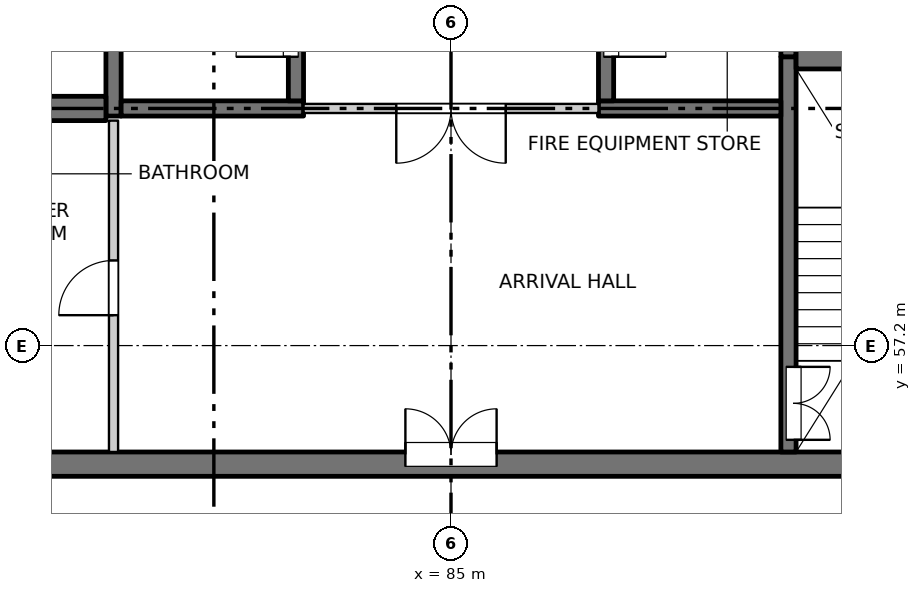
"""IFC4 building model, lengths in metres.
Left out: names, types, materials, properties, quantities, classifications, styles, units other than length and angle.
Written with IfcOpenShell. Run it as: python <this file> out.ifc"""

import sys

from ifc_helpers import new_model, si_unit, direction, frame, frame_2d, origin, place, context, subcontext, project, spatial, rectangle, extrude, element, fill, save


model = new_model("IFC4")
c1 = context("Model", 3, precision=1e-05, world=origin(), true_north=direction((0.0, 1.0)))
c2 = subcontext(c1, "Body", "Model", "MODEL_VIEW")
j1 = project(units=[si_unit("LENGTHUNIT", "METRE"), si_unit("PLANEANGLEUNIT", "RADIAN")], contexts=[c1])
p1 = place(None, origin())
s1 = spatial("IfcSite", under=j1, at=p1, CompositionType="ELEMENT")
p2 = place(p1, origin())
s2 = spatial("IfcBuilding", under=s1, at=p2, CompositionType="ELEMENT")
p3 = place(p2, frame((0.0, 0.0, 221.1)))
s3 = spatial("IfcBuildingStorey", under=s2, at=p3, CompositionType="ELEMENT", Elevation=221.1)
p4 = place(p3, frame((75.45, 55.25, -0.25), z_axis=(0.0, 0.0, 1.0), x_axis=(1.0, 0.0, 0.0)))
e1 = element("IfcWall", 1, at=p4, inside=s3, PredefinedType="SOLIDWALL", context=c2, shape_type="SweptSolid", body=[
    extrude(rectangle(XDim=19.1, YDim=0.4, at=frame_2d((9.55, 0.0))), origin(), (0.0, 0.0, 1.0), 3.4),
])
p5 = place(p4, frame((8.8, 0.0, 0.25)))
e2 = element("IfcOpeningElement", 2, at=p5, cuts=e1, PredefinedType="OPENING", context=c2, shape_type="SweptSolid", body=[
    extrude(rectangle(XDim=1.5, YDim=2.1, at=frame_2d((0.75, 1.05))), frame((0.0, 0.21, 0.0), z_axis=(0.0, -1.0, 0.0), x_axis=(1.0, 0.0, 0.0)), (0.0, 0.0, 1.0), 0.42),
])
p6 = place(p3, frame((79.45, 60.975, -0.25), z_axis=(0.0, 0.0, 1.0), x_axis=(0.0, 1.0, 0.0)))
e3 = element("IfcWall", 3, at=p6, inside=s3, PredefinedType="SOLIDWALL", context=c2, shape_type="SweptSolid", body=[
    extrude(rectangle(XDim=16.325, YDim=0.25, at=frame_2d((8.163, 0.0))), origin(), (0.0, 0.0, 1.0), 3.4),
])
p7 = place(p3, frame((90.55, 55.45, -0.25), z_axis=(0.0, 0.0, 1.0), x_axis=(0.0, 1.0, 0.0)))
e4 = element("IfcWall", 4, at=p7, inside=s3, PredefinedType="SOLIDWALL", context=c2, shape_type="SweptSolid", body=[
    extrude(rectangle(XDim=6.5, YDim=0.25, at=frame_2d((3.25, 0.0))), origin(), (0.0, 0.0, 1.0), 3.4),
])
p8 = place(p7, frame((0.2, 0.0, 0.25)))
e5 = element("IfcOpeningElement", 5, at=p8, cuts=e4, PredefinedType="OPENING", context=c2, shape_type="SweptSolid", body=[
    extrude(rectangle(XDim=1.2, YDim=2.1, at=frame_2d((0.6, 1.05))), frame((0.0, 0.135, 0.0), z_axis=(0.0, -1.0, 0.0), x_axis=(1.0, 0.0, 0.0)), (0.0, 0.0, 1.0), 0.27),
])
p9 = place(p3, frame((90.55, 61.95, -0.25), z_axis=(0.0, 0.0, 1.0), x_axis=(0.0, 1.0, 0.0)))
e6 = element("IfcWall", 6, at=p9, inside=s3, PredefinedType="SOLIDWALL", context=c2, shape_type="SweptSolid", body=[
    extrude(rectangle(XDim=15.35, YDim=0.25, at=frame_2d((7.675, 0.0))), origin(), (0.0, 0.0, 1.0), 3.4),
])
p10 = place(p3, frame((79.575, 61.1, -0.25), z_axis=(0.0, 0.0, 1.0), x_axis=(1.0, 0.0, 0.0)))
e7 = element("IfcWall", 7, at=p10, inside=s3, PredefinedType="SOLIDWALL", context=c2, shape_type="SweptSolid", body=[
    extrude(rectangle(XDim=3.0, YDim=0.25, at=frame_2d((1.5, 0.0))), origin(), (0.0, 0.0, 1.0), 3.4),
])
p11 = place(p3, frame((82.45, 61.225, -0.25), z_axis=(0.0, 0.0, 1.0), x_axis=(0.0, 1.0, 0.0)))
e8 = element("IfcWall", 8, at=p11, inside=s3, PredefinedType="SOLIDWALL", context=c2, shape_type="SweptSolid", body=[
    extrude(rectangle(XDim=2.35, YDim=0.25, at=frame_2d((1.175, 0.0))), origin(), (0.0, 0.0, 1.0), 3.4),
])
p12 = place(p11, frame((0.725, 0.0, 0.25)))
e9 = element("IfcOpeningElement", 9, at=p12, cuts=e8, PredefinedType="OPENING", context=c2, shape_type="SweptSolid", body=[
    extrude(rectangle(XDim=0.9, YDim=2.1, at=frame_2d((0.45, 1.05))), frame((0.0, 0.135, 0.0), z_axis=(0.0, -1.0, 0.0), x_axis=(1.0, 0.0, 0.0)), (0.0, 0.0, 1.0), 0.27),
])
p13 = place(p3, frame((87.425, 61.1, -0.25), z_axis=(0.0, 0.0, 1.0), x_axis=(1.0, 0.0, 0.0)))
e10 = element("IfcWall", 10, at=p13, inside=s3, PredefinedType="SOLIDWALL", context=c2, shape_type="SweptSolid", body=[
    extrude(rectangle(XDim=3.0, YDim=0.25, at=frame_2d((1.5, 0.0))), origin(), (0.0, 0.0, 1.0), 3.4),
])
p14 = place(p3, frame((87.55, 61.225, -0.25), z_axis=(0.0, 0.0, 1.0), x_axis=(0.0, 1.0, 0.0)))
e11 = element("IfcWall", 11, at=p14, inside=s3, PredefinedType="SOLIDWALL", context=c2, shape_type="SweptSolid", body=[
    extrude(rectangle(XDim=2.35, YDim=0.25, at=frame_2d((1.175, 0.0))), origin(), (0.0, 0.0, 1.0), 3.4),
])
p15 = place(p14, frame((0.725, 0.0, 0.25)))
e12 = element("IfcOpeningElement", 12, at=p15, cuts=e11, PredefinedType="OPENING", context=c2, shape_type="SweptSolid", body=[
    extrude(rectangle(XDim=0.9, YDim=2.1, at=frame_2d((0.45, 1.05))), frame((0.0, 0.135, 0.0), z_axis=(0.0, -1.0, 0.0), x_axis=(1.0, 0.0, 0.0)), (0.0, 0.0, 1.0), 0.27),
])
for number, where, z_axis, x_axis in (
    (13, (75.45, 61.1, -0.25), (0.0, 0.0, 1.0), (1.0, 0.0, 0.0)),
    (14, (90.675, 61.95, -0.25), (0.0, 0.0, 1.0), (1.0, 0.0, 0.0)),
):
    element("IfcWall", number, at=place(p3, frame(where, z_axis=z_axis, x_axis=x_axis)), inside=s3, PredefinedType="SOLIDWALL", context=c2, shape_type="SweptSolid", body=[
        extrude(rectangle(XDim=3.875, YDim=0.4, at=frame_2d((1.938, 0.0))), origin(), (0.0, 0.0, 1.0), 3.4),
    ])
p16 = place(p3, frame((82.575, 61.1, 0.0), z_axis=(0.0, 0.0, 1.0), x_axis=(1.0, 0.0, 0.0)))
e15 = element("IfcWall", 15, at=p16, inside=s3, PredefinedType="PARTITIONING", context=c2, shape_type="SweptSolid", body=[
    extrude(rectangle(XDim=4.85, YDim=0.15, at=frame_2d((2.425, 0.0))), origin(), (0.0, 0.0, 1.0), 3.15),
])
p17 = place(p16, frame((1.525, 0.0, 0.0)))
e16 = element("IfcOpeningElement", 16, at=p17, cuts=e15, PredefinedType="OPENING", context=c2, shape_type="SweptSolid", body=[
    extrude(rectangle(XDim=1.8, YDim=2.1, at=frame_2d((0.9, 1.05))), frame((0.0, 0.085, 0.0), z_axis=(0.0, -1.0, 0.0), x_axis=(1.0, 0.0, 0.0)), (0.0, 0.0, 1.0), 0.17),
])
p18 = place(p3, frame((79.45, 55.45, 0.0), z_axis=(0.0, 0.0, 1.0), x_axis=(0.0, 1.0, 0.0)))
e17 = element("IfcWall", 17, at=p18, inside=s3, PredefinedType="PARTITIONING", context=c2, shape_type="SweptSolid", body=[
    extrude(rectangle(XDim=5.45, YDim=0.15, at=frame_2d((2.725, 0.0))), origin(), (0.0, 0.0, 1.0), 3.15),
])
p19 = place(p18, frame((2.25, 0.0, 0.0)))
e18 = element("IfcOpeningElement", 18, at=p19, cuts=e17, PredefinedType="OPENING", context=c2, shape_type="SweptSolid", body=[
    extrude(rectangle(XDim=0.9, YDim=2.1, at=frame_2d((0.45, 1.05))), frame((0.0, 0.085, 0.0), z_axis=(0.0, -1.0, 0.0), x_axis=(1.0, 0.0, 0.0)), (0.0, 0.0, 1.0), 0.17),
])
p20 = place(p5, origin())
e19 = element("IfcDoor", 19, at=p20, inside=s3, OperationType="DOUBLE_DOOR_SINGLE_SWING", PredefinedType="DOOR", context=c2, shape_type="SweptSolid", body=[
    extrude(rectangle(XDim=1.5, YDim=2.1, at=frame_2d((0.75, 1.05))), frame((0.0, 0.185, 0.0), z_axis=(0.0, -1.0, 0.0), x_axis=(1.0, 0.0, 0.0)), (0.0, 0.0, 1.0), 0.05),
])
fill(e2, e19)
p21 = place(p8, origin())
e20 = element("IfcDoor", 20, at=p21, inside=s3, OperationType="DOUBLE_DOOR_SINGLE_SWING", PredefinedType="DOOR", context=c2, shape_type="SweptSolid", body=[
    extrude(rectangle(XDim=1.2, YDim=2.1, at=frame_2d((0.6, 1.05))), frame((0.0, -0.06, 0.0), z_axis=(0.0, -1.0, 0.0), x_axis=(1.0, 0.0, 0.0)), (0.0, 0.0, 1.0), 0.05),
])
fill(e5, e20)
p22 = place(p19, origin())
e21 = element("IfcDoor", 21, at=p22, inside=s3, OperationType="SINGLE_SWING_LEFT", PredefinedType="DOOR", context=c2, shape_type="SweptSolid", body=[
    extrude(rectangle(XDim=0.9, YDim=2.1, at=frame_2d((0.45, 1.05))), frame((0.0, 0.025, 0.0), z_axis=(0.0, -1.0, 0.0), x_axis=(1.0, 0.0, 0.0)), (0.0, 0.0, 1.0), 0.05),
])
fill(e18, e21)
p23 = place(p17, origin())
e22 = element("IfcDoor", 22, at=p23, inside=s3, OperationType="DOUBLE_DOOR_SINGLE_SWING", PredefinedType="DOOR", context=c2, shape_type="SweptSolid", body=[
    extrude(rectangle(XDim=1.8, YDim=2.1, at=frame_2d((0.9, 1.05))), frame((0.0, 0.025, 0.0), z_axis=(0.0, -1.0, 0.0), x_axis=(1.0, 0.0, 0.0)), (0.0, 0.0, 1.0), 0.05),
])
fill(e16, e22)
p24 = place(p12, origin())
e23 = element("IfcDoor", 23, at=p24, inside=s3, OperationType="SINGLE_SWING_LEFT", PredefinedType="DOOR", context=c2, shape_type="SweptSolid", body=[
    extrude(rectangle(XDim=0.9, YDim=2.1, at=frame_2d((0.45, 1.05))), frame((0.0, 0.11, 0.0), z_axis=(0.0, -1.0, 0.0), x_axis=(1.0, 0.0, 0.0)), (0.0, 0.0, 1.0), 0.05),
])
fill(e9, e23)
p25 = place(p15, origin())
e24 = element("IfcDoor", 24, at=p25, inside=s3, OperationType="SINGLE_SWING_RIGHT", PredefinedType="DOOR", context=c2, shape_type="SweptSolid", body=[
    extrude(rectangle(XDim=0.9, YDim=2.1, at=frame_2d((0.45, 1.05))), frame((0.0, -0.06, 0.0), z_axis=(0.0, -1.0, 0.0), x_axis=(1.0, 0.0, 0.0)), (0.0, 0.0, 1.0), 0.05),
])
fill(e12, e24)
save(model, sys.argv[1])
